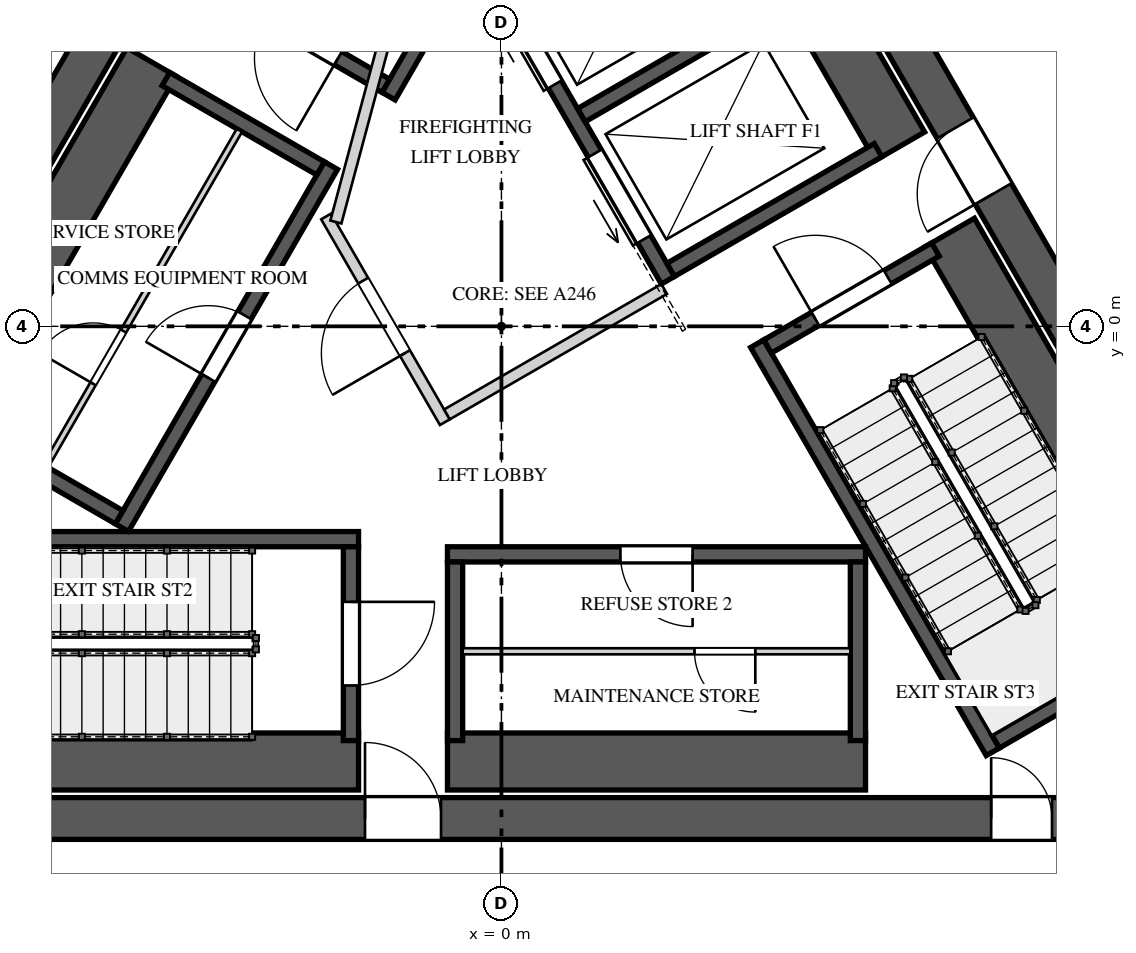
"""IFC4 building model, lengths in metres.
Left out: names, types, materials, properties, quantities, classifications, styles, units other than length and angle.
Written with IfcOpenShell. Run it as: python <this file> out.ifc"""

import sys

from ifc_helpers import new_model, si_unit, direction, frame, frame_2d, origin, place, context, subcontext, project, spatial, rectangle, extrude, element, fill, save


model = new_model("IFC4")
c1 = context("Model", 3, precision=1e-05, world=origin(), true_north=direction((0.0, 1.0)))
c2 = subcontext(c1, "Body", "Model", "MODEL_VIEW")
j1 = project(units=[si_unit("LENGTHUNIT", "METRE"), si_unit("PLANEANGLEUNIT", "RADIAN")], contexts=[c1])
p1 = place(None, origin())
s1 = spatial("IfcSite", under=j1, at=p1, CompositionType="ELEMENT")
p2 = place(p1, origin())
s2 = spatial("IfcBuilding", under=s1, at=p2, CompositionType="ELEMENT")
p3 = place(p2, frame((0.0, 0.0, 356.9)))
s3 = spatial("IfcBuildingStorey", under=s2, at=p3, CompositionType="ELEMENT", Elevation=356.9)
p4 = place(p3, frame((-1.285, 10.725, 0.0), z_axis=(0.0, 0.0, 1.0), x_axis=(-0.499994590896, -0.86602852671, 0.0)))
e1 = element("IfcWall", 1, at=p4, inside=s3, PredefinedType="SHEAR", context=c2, shape_type="SweptSolid", body=[
    extrude(rectangle(XDim=17.292, YDim=0.55, at=frame_2d((8.646, 0.0))), origin(), (0.0, 0.0, 1.0), 4.5),
])
p5 = place(p4, frame((6.851, 0.0, 0.0)))
e2 = element("IfcOpeningElement", 2, at=p5, cuts=e1, PredefinedType="OPENING", context=c2, shape_type="SweptSolid", body=[
    extrude(rectangle(XDim=1.0, YDim=2.4, at=frame_2d((0.5, 1.2))), frame((0.0, 0.285, 0.0), z_axis=(0.0, -1.0, 0.0), x_axis=(1.0, 0.0, 0.0)), (0.0, 0.0, 1.0), 0.57),
])
p6 = place(p4, frame((15.089, 0.0, 0.0)))
e3 = element("IfcOpeningElement", 3, at=p6, cuts=e1, PredefinedType="OPENING", context=c2, shape_type="SweptSolid", body=[
    extrude(rectangle(XDim=0.8, YDim=2.1, at=frame_2d((0.4, 1.05))), frame((0.0, 0.285, 0.0), z_axis=(0.0, -1.0, 0.0), x_axis=(1.0, 0.0, 0.0)), (0.0, 0.0, 1.0), 0.57),
])
p7 = place(p3, frame((-8.646, -6.475, 0.0), z_axis=(0.0, 0.0, 1.0), x_axis=(1.0, 0.0, 0.0)))
e4 = element("IfcWall", 4, at=p7, inside=s3, PredefinedType="SHEAR", context=c2, shape_type="SweptSolid", body=[
    extrude(rectangle(XDim=17.292, YDim=0.55, at=frame_2d((8.646, 0.0))), origin(), (0.0, 0.0, 1.0), 4.5),
])
p8 = place(p7, frame((6.851, 0.0, 0.0)))
e5 = element("IfcOpeningElement", 5, at=p8, cuts=e4, PredefinedType="OPENING", context=c2, shape_type="SweptSolid", body=[
    extrude(rectangle(XDim=1.0, YDim=2.4, at=frame_2d((0.5, 1.2))), frame((0.0, 0.285, 0.0), z_axis=(0.0, -1.0, 0.0), x_axis=(1.0, 0.0, 0.0)), (0.0, 0.0, 1.0), 0.57),
])
p9 = place(p7, frame((15.089, 0.0, 0.0)))
e6 = element("IfcOpeningElement", 6, at=p9, cuts=e4, PredefinedType="OPENING", context=c2, shape_type="SweptSolid", body=[
    extrude(rectangle(XDim=0.8, YDim=2.1, at=frame_2d((0.4, 1.05))), frame((0.0, 0.285, 0.0), z_axis=(0.0, -1.0, 0.0), x_axis=(1.0, 0.0, 0.0)), (0.0, 0.0, 1.0), 0.57),
])
p10 = place(p3, frame((9.93, -4.25, 0.0), z_axis=(0.0, 0.0, 1.0), x_axis=(-0.499994590896, 0.86602852671, 0.0)))
e7 = element("IfcWall", 7, at=p10, inside=s3, PredefinedType="SHEAR", context=c2, shape_type="SweptSolid", body=[
    extrude(rectangle(XDim=17.292, YDim=0.55, at=frame_2d((8.646, 0.0))), origin(), (0.0, 0.0, 1.0), 4.5),
])
p11 = place(p10, frame((6.921, 0.0, 0.0)))
e8 = element("IfcOpeningElement", 8, at=p11, cuts=e7, PredefinedType="OPENING", context=c2, shape_type="SweptSolid", body=[
    extrude(rectangle(XDim=1.0, YDim=2.4, at=frame_2d((0.5, 1.2))), frame((0.0, 0.285, 0.0), z_axis=(0.0, -1.0, 0.0), x_axis=(1.0, 0.0, 0.0)), (0.0, 0.0, 1.0), 0.57),
])
p12 = place(p3, frame((1.615, 8.397, 0.0), z_axis=(0.0, 0.0, 1.0), x_axis=(-0.500009909098, -0.866019682689, 0.0)))
e9 = element("IfcWall", 9, at=p12, inside=s3, PredefinedType="SOLIDWALL", context=c2, shape_type="SweptSolid", body=[
    extrude(rectangle(XDim=6.2, YDim=0.2, at=frame_2d((3.1, 0.0))), origin(), (0.0, 0.0, 1.0), 4.15),
])
p13 = place(p3, frame((-1.521, 3.165, 0.0), z_axis=(0.0, 0.0, 1.0), x_axis=(-0.866030925526, 0.499990435942, 0.0)))
e10 = element("IfcWall", 10, at=p13, inside=s3, PredefinedType="SOLIDWALL", context=c2, shape_type="SweptSolid", body=[
    extrude(rectangle(XDim=2.55, YDim=0.2, at=frame_2d((1.275, 0.0))), origin(), (0.0, 0.0, 1.0), 4.15),
])
p14 = place(p13, frame((0.725, 0.0, 0.0)))
e11 = element("IfcOpeningElement", 11, at=p14, cuts=e10, PredefinedType="OPENING", context=c2, shape_type="SweptSolid", body=[
    extrude(rectangle(XDim=1.1, YDim=2.4, at=frame_2d((0.55, 1.2))), frame((0.0, 0.11, 0.0), z_axis=(0.0, -1.0, 0.0), x_axis=(1.0, 0.0, 0.0)), (0.0, 0.0, 1.0), 0.22),
])
p15 = place(p3, frame((-8.08, -5.725, 0.0), z_axis=(0.0, 0.0, 1.0), x_axis=(1.0, 0.0, 0.0)))
e12 = element("IfcWall", 12, at=p15, inside=s3, PredefinedType="SOLIDWALL", context=c2, shape_type="SweptSolid", body=[
    extrude(rectangle(XDim=6.2, YDim=0.75, at=frame_2d((3.1, 0.0))), origin(), (0.0, 0.0, 1.0), 4.15),
])
p16 = place(p3, frame((-8.08, -2.8, 0.0), z_axis=(0.0, 0.0, 1.0), x_axis=(1.0, 0.0, 0.0)))
e13 = element("IfcWall", 13, at=p16, inside=s3, PredefinedType="SOLIDWALL", context=c2, shape_type="SweptSolid", body=[
    extrude(rectangle(XDim=6.2, YDim=0.2, at=frame_2d((3.1, 0.0))), origin(), (0.0, 0.0, 1.0), 4.15),
])
p17 = place(p3, frame((-1.98, -2.9, 0.0), z_axis=(0.0, 0.0, 1.0), x_axis=(0.0, -1.0, 0.0)))
e14 = element("IfcWall", 14, at=p17, inside=s3, PredefinedType="SOLIDWALL", context=c2, shape_type="SweptSolid", body=[
    extrude(rectangle(XDim=2.55, YDim=0.2, at=frame_2d((1.275, 0.0))), origin(), (0.0, 0.0, 1.0), 4.15),
])
p18 = place(p17, frame((0.725, 0.0, 0.0)))
e15 = element("IfcOpeningElement", 15, at=p18, cuts=e14, PredefinedType="OPENING", context=c2, shape_type="SweptSolid", body=[
    extrude(rectangle(XDim=1.1, YDim=2.4, at=frame_2d((0.55, 1.2))), frame((0.0, 0.11, 0.0), z_axis=(0.0, -1.0, 0.0), x_axis=(1.0, 0.0, 0.0)), (0.0, 0.0, 1.0), 0.22),
])
p19 = place(p3, frame((8.998, -4.135, 0.0), z_axis=(0.0, 0.0, 1.0), x_axis=(-0.500009909098, 0.866019682689, 0.0)))
e16 = element("IfcWall", 16, at=p19, inside=s3, PredefinedType="SOLIDWALL", context=c2, shape_type="SweptSolid", body=[
    extrude(rectangle(XDim=6.2, YDim=0.75, at=frame_2d((3.1, 0.0))), origin(), (0.0, 0.0, 1.0), 4.15),
])
p20 = place(p3, frame((6.465, -5.597, 0.0), z_axis=(0.0, 0.0, 1.0), x_axis=(-0.49998037582, 0.866036733513, 0.0)))
e17 = element("IfcWall", 17, at=p20, inside=s3, PredefinedType="SOLIDWALL", context=c2, shape_type="SweptSolid", body=[
    extrude(rectangle(XDim=6.2, YDim=0.2, at=frame_2d((3.1, 0.0))), origin(), (0.0, 0.0, 1.0), 4.15),
])
p21 = place(p3, frame((6.501, -5.461, 0.0), z_axis=(0.0, 0.0, 1.0), x_axis=(0.865989465428, 0.500062241894, 0.0)))
e18 = element("IfcWall", 18, at=p21, inside=s3, PredefinedType="SOLIDWALL", context=c2, shape_type="SweptSolid", body=[
    extrude(rectangle(XDim=2.55, YDim=0.2, at=frame_2d((1.275, 0.0))), origin(), (0.0, 0.0, 1.0), 4.15),
])
p22 = place(p3, frame((3.501, -0.265, 0.0), z_axis=(0.0, 0.0, 1.0), x_axis=(0.866030925526, 0.499990435942, 0.0)))
e19 = element("IfcWall", 19, at=p22, inside=s3, PredefinedType="SOLIDWALL", context=c2, shape_type="SweptSolid", body=[
    extrude(rectangle(XDim=2.55, YDim=0.2, at=frame_2d((1.275, 0.0))), origin(), (0.0, 0.0, 1.0), 4.15),
])
p23 = place(p22, frame((0.725, 0.0, 0.0)))
e20 = element("IfcOpeningElement", 20, at=p23, cuts=e19, PredefinedType="OPENING", context=c2, shape_type="SweptSolid", body=[
    extrude(rectangle(XDim=1.1, YDim=2.4, at=frame_2d((0.55, 1.2))), frame((0.0, 0.11, 0.0), z_axis=(0.0, -1.0, 0.0), x_axis=(1.0, 0.0, 0.0)), (0.0, 0.0, 1.0), 0.22),
])
p24 = place(p3, frame((-4.993, -2.648, 0.0), z_axis=(0.0, 0.0, 1.0), x_axis=(0.499996545922, 0.866027397988, 0.0)))
e21 = element("IfcWall", 21, at=p24, inside=s3, PredefinedType="SOLIDWALL", context=c2, shape_type="SweptSolid", body=[
    extrude(rectangle(XDim=5.5, YDim=0.2, at=frame_2d((2.75, 0.0))), origin(), (0.0, 0.0, 1.0), 4.15),
])
p25 = place(p24, frame((2.275, 0.0, 0.0)))
e22 = element("IfcOpeningElement", 22, at=p25, cuts=e21, PredefinedType="OPENING", context=c2, shape_type="SweptSolid", body=[
    extrude(rectangle(XDim=0.95, YDim=2.4, at=frame_2d((0.475, 1.2))), frame((0.0, 0.11, 0.0), z_axis=(0.0, -1.0, 0.0), x_axis=(1.0, 0.0, 0.0)), (0.0, 0.0, 1.0), 0.22),
])
p26 = place(p3, frame((-4.603, 3.477, 0.0), z_axis=(0.0, 0.0, 1.0), x_axis=(-0.500015767406, -0.866016300277, 0.0)))
e23 = element("IfcWall", 23, at=p26, inside=s3, PredefinedType="SOLIDWALL", context=c2, shape_type="SweptSolid", body=[
    extrude(rectangle(XDim=5.5, YDim=0.75, at=frame_2d((2.75, 0.0))), origin(), (0.0, 0.0, 1.0), 4.15),
])
p27 = place(p3, frame((-2.38, 2.078, 0.0), z_axis=(0.0, 0.0, 1.0), x_axis=(-0.866061024631, 0.499938297808, 0.0)))
e24 = element("IfcWall", 24, at=p27, inside=s3, PredefinedType="SOLIDWALL", context=c2, shape_type="SweptSolid", body=[
    extrude(rectangle(XDim=2.35, YDim=0.2, at=frame_2d((1.175, 0.0))), origin(), (0.0, 0.0, 1.0), 4.15),
])
p28 = place(p3, frame((-5.03, -2.512, 0.0), z_axis=(0.0, 0.0, 1.0), x_axis=(-0.866016039709, 0.500016218704, 0.0)))
e25 = element("IfcWall", 25, at=p28, inside=s3, PredefinedType="SOLIDWALL", context=c2, shape_type="SweptSolid", body=[
    extrude(rectangle(XDim=2.35, YDim=0.2, at=frame_2d((1.175, 0.0))), origin(), (0.0, 0.0, 1.0), 4.15),
])
p29 = place(p3, frame((-5.997, -1.838, 0.0), z_axis=(0.0, 0.0, 1.0), x_axis=(0.500005610874, 0.86602216432, 0.0)))
e26 = element("IfcWall", 26, at=p29, inside=s3, PredefinedType="PARTITIONING", context=c2, shape_type="SweptSolid", body=[
    extrude(rectangle(XDim=5.1, YDim=0.08, at=frame_2d((2.55, 0.0))), origin(), (0.0, 0.0, 1.0), 4.15),
])
p30 = place(p29, frame((1.25, 0.0, 0.0)))
e27 = element("IfcOpeningElement", 27, at=p30, cuts=e26, PredefinedType="OPENING", context=c2, shape_type="SweptSolid", body=[
    extrude(rectangle(XDim=0.8, YDim=2.1, at=frame_2d((0.4, 1.05))), frame((0.0, 0.05, 0.0), z_axis=(0.0, -1.0, 0.0), x_axis=(1.0, 0.0, 0.0)), (0.0, 0.0, 1.0), 0.1),
])
p31 = place(p3, frame((4.79, -3.0, 0.0), z_axis=(0.0, 0.0, 1.0), x_axis=(-1.0, 0.0, 0.0)))
e28 = element("IfcWall", 28, at=p31, inside=s3, PredefinedType="SOLIDWALL", context=c2, shape_type="SweptSolid", body=[
    extrude(rectangle(XDim=5.5, YDim=0.2, at=frame_2d((2.75, 0.0))), origin(), (0.0, 0.0, 1.0), 4.15),
])
p32 = place(p31, frame((2.275, 0.0, 0.0)))
e29 = element("IfcOpeningElement", 29, at=p32, cuts=e28, PredefinedType="OPENING", context=c2, shape_type="SweptSolid", body=[
    extrude(rectangle(XDim=0.95, YDim=2.4, at=frame_2d((0.475, 1.2))), frame((0.0, 0.11, 0.0), z_axis=(0.0, -1.0, 0.0), x_axis=(1.0, 0.0, 0.0)), (0.0, 0.0, 1.0), 0.22),
])
p33 = place(p3, frame((-0.71, -5.725, 0.0), z_axis=(0.0, 0.0, 1.0), x_axis=(1.0, 0.0, 0.0)))
e30 = element("IfcWall", 30, at=p33, inside=s3, PredefinedType="SOLIDWALL", context=c2, shape_type="SweptSolid", body=[
    extrude(rectangle(XDim=5.5, YDim=0.75, at=frame_2d((2.75, 0.0))), origin(), (0.0, 0.0, 1.0), 4.15),
])
for number, where, z_axis, x_axis in (
    (31, (-0.61, -3.1, 0.0), (0.0, 0.0, 1.0), (0.0, -1.0, 0.0)),
    (32, (4.69, -3.1, 0.0), (0.0, 0.0, 1.0), (0.0, -1.0, 0.0)),
):
    element("IfcWall", number, at=place(p3, frame(where, z_axis=z_axis, x_axis=x_axis)), inside=s3, PredefinedType="SOLIDWALL", context=c2, shape_type="SweptSolid", body=[
        extrude(rectangle(XDim=2.35, YDim=0.2, at=frame_2d((1.175, 0.0))), origin(), (0.0, 0.0, 1.0), 4.15),
    ])
p34 = place(p3, frame((4.59, -4.275, 0.0), z_axis=(0.0, 0.0, 1.0), x_axis=(-1.0, 0.0, 0.0)))
e33 = element("IfcWall", 33, at=p34, inside=s3, PredefinedType="PARTITIONING", context=c2, shape_type="SweptSolid", body=[
    extrude(rectangle(XDim=5.1, YDim=0.08, at=frame_2d((2.55, 0.0))), origin(), (0.0, 0.0, 1.0), 4.15),
])
p35 = place(p34, frame((1.25, 0.0, 0.0)))
e34 = element("IfcOpeningElement", 34, at=p35, cuts=e33, PredefinedType="OPENING", context=c2, shape_type="SweptSolid", body=[
    extrude(rectangle(XDim=0.8, YDim=2.1, at=frame_2d((0.4, 1.05))), frame((0.0, 0.05, 0.0), z_axis=(0.0, -1.0, 0.0), x_axis=(1.0, 0.0, 0.0)), (0.0, 0.0, 1.0), 0.1),
])
p36 = place(p3, frame((2.19, 0.606, 0.0), z_axis=(0.0, 0.0, 1.0), x_axis=(-0.500002801628, 0.866023786258, 0.0)))
e35 = element("IfcWall", 35, at=p36, inside=s3, PredefinedType="SOLIDWALL", context=c2, shape_type="SweptSolid", body=[
    extrude(rectangle(XDim=4.9, YDim=0.2, at=frame_2d((2.45, 0.0))), origin(), (0.0, 0.0, 1.0), 4.15),
])
p37 = place(p36, frame((0.625, 0.0, 0.0)))
e36 = element("IfcOpeningElement", 36, at=p37, cuts=e35, PredefinedType="OPENING", context=c2, shape_type="SweptSolid", body=[
    extrude(rectangle(XDim=1.3, YDim=2.1, at=frame_2d((0.65, 1.05))), frame((0.0, 0.11, 0.0), z_axis=(0.0, -1.0, 0.0), x_axis=(1.0, 0.0, 0.0)), (0.0, 0.0, 1.0), 0.22),
])
p38 = place(p36, frame((2.975, 0.0, 0.0)))
e37 = element("IfcOpeningElement", 37, at=p38, cuts=e35, PredefinedType="OPENING", context=c2, shape_type="SweptSolid", body=[
    extrude(rectangle(XDim=1.3, YDim=2.1, at=frame_2d((0.65, 1.05))), frame((0.0, 0.11, 0.0), z_axis=(0.0, -1.0, 0.0), x_axis=(1.0, 0.0, 0.0)), (0.0, 0.0, 1.0), 0.22),
])
p39 = place(p3, frame((5.243, 2.369, 0.0), z_axis=(0.0, 0.0, 1.0), x_axis=(-0.500002801628, 0.866023786258, 0.0)))
e38 = element("IfcWall", 38, at=p39, inside=s3, PredefinedType="SOLIDWALL", context=c2, shape_type="SweptSolid", body=[
    extrude(rectangle(XDim=4.9, YDim=0.75, at=frame_2d((2.45, 0.0))), origin(), (0.0, 0.0, 1.0), 4.15),
])
for number, where, z_axis, x_axis in (
    (39, (2.227, 0.743, 0.0), (0.0, 0.0, 1.0), (0.866, 0.5, 0.0)),
    (40, (1.052, 2.778, 0.0), (0.0, 0.0, 1.0), (0.866, 0.5, 0.0)),
):
    element("IfcWall", number, at=place(p3, frame(where, z_axis=z_axis, x_axis=x_axis)), inside=s3, PredefinedType="SOLIDWALL", context=c2, shape_type="SweptSolid", body=[
        extrude(rectangle(XDim=3.15, YDim=0.2, at=frame_2d((1.575, 0.0))), origin(), (0.0, 0.0, 1.0), 4.15),
    ])
p40 = place(p3, frame((-0.744, -1.261, 0.0), z_axis=(0.0, 0.0, 1.0), x_axis=(-0.500004234368, 0.866022959057, 0.0)))
e41 = element("IfcWall", 41, at=p40, inside=s3, PredefinedType="PARTITIONING", context=c2, shape_type="SweptSolid", body=[
    extrude(rectangle(XDim=3.125, YDim=0.15, at=frame_2d((1.562, 0.0))), origin(), (0.0, 0.0, 1.0), 4.15),
])
p41 = place(p40, frame((1.05, 0.0, 0.0)))
e42 = element("IfcOpeningElement", 42, at=p41, cuts=e41, PredefinedType="OPENING", context=c2, shape_type="SweptSolid", body=[
    extrude(rectangle(XDim=1.1, YDim=2.4, at=frame_2d((0.55, 1.2))), frame((0.0, 0.085, 0.0), z_axis=(0.0, -1.0, 0.0), x_axis=(1.0, 0.0, 0.0)), (0.0, 0.0, 1.0), 0.17),
])
p42 = place(p3, frame((-0.717, -1.159, 0.0), z_axis=(0.0, 0.0, 1.0), x_axis=(0.866008176907, 0.50002983664, 0.0)))
e43 = element("IfcWall", 43, at=p42, inside=s3, PredefinedType="PARTITIONING", context=c2, shape_type="SweptSolid", body=[
    extrude(rectangle(XDim=3.3, YDim=0.15, at=frame_2d((1.65, 0.0))), origin(), (0.0, 0.0, 1.0), 4.15),
])
p43 = place(p3, frame((-2.178, 1.372, 0.0), z_axis=(0.0, 0.0, 1.0), x_axis=(0.258808958833, 0.96592852884, 0.0)))
e44 = element("IfcWall", 44, at=p43, inside=s3, PredefinedType="PARTITIONING", context=c2, shape_type="SweptSolid", body=[
    extrude(rectangle(XDim=2.903, YDim=0.15, at=frame_2d((1.451, 0.0))), origin(), (0.0, 0.0, 1.0), 4.15),
])
p44 = place(p3, frame((7.146, 4.722, 0.0), z_axis=(0.0, 0.0, 1.0), x_axis=(0.499955681623, -0.866050989499, 0.0)))
e45 = element("IfcWall", 45, at=p44, inside=s3, PredefinedType="SOLIDWALL", context=c2, shape_type="SweptSolid", body=[
    extrude(rectangle(XDim=1.238, YDim=0.2, at=frame_2d((0.619, 0.0))), origin(), (0.0, 0.0, 1.0), 4.15),
])
p45 = place(p44, frame((0.05, 0.0, 0.0)))
e46 = element("IfcOpeningElement", 46, at=p45, cuts=e45, PredefinedType="OPENING", context=c2, shape_type="SweptSolid", body=[
    extrude(rectangle(XDim=1.1, YDim=2.4, at=frame_2d((0.55, 1.2))), frame((0.0, 0.11, 0.0), z_axis=(0.0, -1.0, 0.0), x_axis=(1.0, 0.0, 0.0)), (0.0, 0.0, 1.0), 0.22),
])
p46 = place(p14, origin())
e47 = element("IfcDoor", 47, at=p46, inside=s3, OperationType="SINGLE_SWING_RIGHT", PredefinedType="DOOR", context=c2, shape_type="SweptSolid", body=[
    extrude(rectangle(XDim=1.1, YDim=2.4, at=frame_2d((0.55, 1.2))), frame((0.0, 0.025, 0.0), z_axis=(0.0, -1.0, 0.0), x_axis=(1.0, 0.0, 0.0)), (0.0, 0.0, 1.0), 0.05),
])
fill(e11, e47)
p47 = place(p18, origin())
e48 = element("IfcDoor", 48, at=p47, inside=s3, OperationType="SINGLE_SWING_LEFT", PredefinedType="DOOR", context=c2, shape_type="SweptSolid", body=[
    extrude(rectangle(XDim=1.1, YDim=2.4, at=frame_2d((0.55, 1.2))), frame((0.0, 0.025, 0.0), z_axis=(0.0, -1.0, 0.0), x_axis=(1.0, 0.0, 0.0)), (0.0, 0.0, 1.0), 0.05),
])
fill(e15, e48)
p48 = place(p23, origin())
e49 = element("IfcDoor", 49, at=p48, inside=s3, OperationType="SINGLE_SWING_RIGHT", PredefinedType="DOOR", context=c2, shape_type="SweptSolid", body=[
    extrude(rectangle(XDim=1.1, YDim=2.4, at=frame_2d((0.55, 1.2))), frame((0.0, 0.025, 0.0), z_axis=(0.0, -1.0, 0.0), x_axis=(1.0, 0.0, 0.0)), (0.0, 0.0, 1.0), 0.05),
])
fill(e20, e49)
p49 = place(p25, origin())
e50 = element("IfcDoor", 50, at=p49, inside=s3, OperationType="SINGLE_SWING_LEFT", PredefinedType="DOOR", context=c2, shape_type="SweptSolid", body=[
    extrude(rectangle(XDim=0.95, YDim=2.4, at=frame_2d((0.475, 1.2))), frame((0.0, 0.025, 0.0), z_axis=(0.0, -1.0, 0.0), x_axis=(1.0, 0.0, 0.0)), (0.0, 0.0, 1.0), 0.05),
])
fill(e22, e50)
p50 = place(p30, origin())
e51 = element("IfcDoor", 51, at=p50, inside=s3, OperationType="SINGLE_SWING_RIGHT", PredefinedType="DOOR", context=c2, shape_type="SweptSolid", body=[
    extrude(rectangle(XDim=0.8, YDim=2.1, at=frame_2d((0.4, 1.05))), frame((0.0, 0.025, 0.0), z_axis=(0.0, -1.0, 0.0), x_axis=(1.0, 0.0, 0.0)), (0.0, 0.0, 1.0), 0.05),
])
fill(e27, e51)
p51 = place(p32, origin())
e52 = element("IfcDoor", 52, at=p51, inside=s3, OperationType="SINGLE_SWING_LEFT", PredefinedType="DOOR", context=c2, shape_type="SweptSolid", body=[
    extrude(rectangle(XDim=0.95, YDim=2.4, at=frame_2d((0.475, 1.2))), frame((0.0, 0.025, 0.0), z_axis=(0.0, -1.0, 0.0), x_axis=(1.0, 0.0, 0.0)), (0.0, 0.0, 1.0), 0.05),
])
fill(e29, e52)
p52 = place(p35, origin())
e53 = element("IfcDoor", 53, at=p52, inside=s3, OperationType="SINGLE_SWING_RIGHT", PredefinedType="DOOR", context=c2, shape_type="SweptSolid", body=[
    extrude(rectangle(XDim=0.8, YDim=2.1, at=frame_2d((0.4, 1.05))), frame((0.0, 0.025, 0.0), z_axis=(0.0, -1.0, 0.0), x_axis=(1.0, 0.0, 0.0)), (0.0, 0.0, 1.0), 0.05),
])
fill(e34, e53)
p53 = place(p37, origin())
e54 = element("IfcDoor", 54, at=p53, inside=s3, OperationType="SLIDING_TO_LEFT", PredefinedType="DOOR", context=c2, shape_type="SweptSolid", body=[
    extrude(rectangle(XDim=1.3, YDim=2.1, at=frame_2d((0.65, 1.05))), frame((0.0, 0.025, 0.0), z_axis=(0.0, -1.0, 0.0), x_axis=(1.0, 0.0, 0.0)), (0.0, 0.0, 1.0), 0.05),
])
fill(e36, e54)
p54 = place(p38, origin())
e55 = element("IfcDoor", 55, at=p54, inside=s3, OperationType="SLIDING_TO_RIGHT", PredefinedType="DOOR", context=c2, shape_type="SweptSolid", body=[
    extrude(rectangle(XDim=1.3, YDim=2.1, at=frame_2d((0.65, 1.05))), frame((0.0, 0.025, 0.0), z_axis=(0.0, -1.0, 0.0), x_axis=(1.0, 0.0, 0.0)), (0.0, 0.0, 1.0), 0.05),
])
fill(e37, e55)
p55 = place(p41, origin())
e56 = element("IfcDoor", 56, at=p55, inside=s3, OperationType="SINGLE_SWING_LEFT", PredefinedType="DOOR", context=c2, shape_type="SweptSolid", body=[
    extrude(rectangle(XDim=1.1, YDim=2.4, at=frame_2d((0.55, 1.2))), frame((0.0, 0.025, 0.0), z_axis=(0.0, -1.0, 0.0), x_axis=(1.0, 0.0, 0.0)), (0.0, 0.0, 1.0), 0.05),
])
fill(e42, e56)
p56 = place(p8, origin())
e57 = element("IfcDoor", 57, at=p56, inside=s3, OperationType="SINGLE_SWING_LEFT", PredefinedType="DOOR", context=c2, shape_type="SweptSolid", body=[
    extrude(rectangle(XDim=1.0, YDim=2.4, at=frame_2d((0.5, 1.2))), frame((0.0, 0.025, 0.0), z_axis=(0.0, -1.0, 0.0), x_axis=(1.0, 0.0, 0.0)), (0.0, 0.0, 1.0), 0.05),
])
fill(e5, e57)
p57 = place(p11, origin())
e58 = element("IfcDoor", 58, at=p57, inside=s3, OperationType="SINGLE_SWING_RIGHT", PredefinedType="DOOR", context=c2, shape_type="SweptSolid", body=[
    extrude(rectangle(XDim=1.0, YDim=2.4, at=frame_2d((0.5, 1.2))), frame((0.0, 0.025, 0.0), z_axis=(0.0, -1.0, 0.0), x_axis=(1.0, 0.0, 0.0)), (0.0, 0.0, 1.0), 0.05),
])
fill(e8, e58)
p58 = place(p9, origin())
e59 = element("IfcDoor", 59, at=p58, inside=s3, OperationType="SINGLE_SWING_RIGHT", PredefinedType="DOOR", context=c2, shape_type="SweptSolid", body=[
    extrude(rectangle(XDim=0.8, YDim=2.1, at=frame_2d((0.4, 1.05))), frame((0.0, 0.025, 0.0), z_axis=(0.0, -1.0, 0.0), x_axis=(1.0, 0.0, 0.0)), (0.0, 0.0, 1.0), 0.05),
])
fill(e6, e59)
save(model, sys.argv[1])
